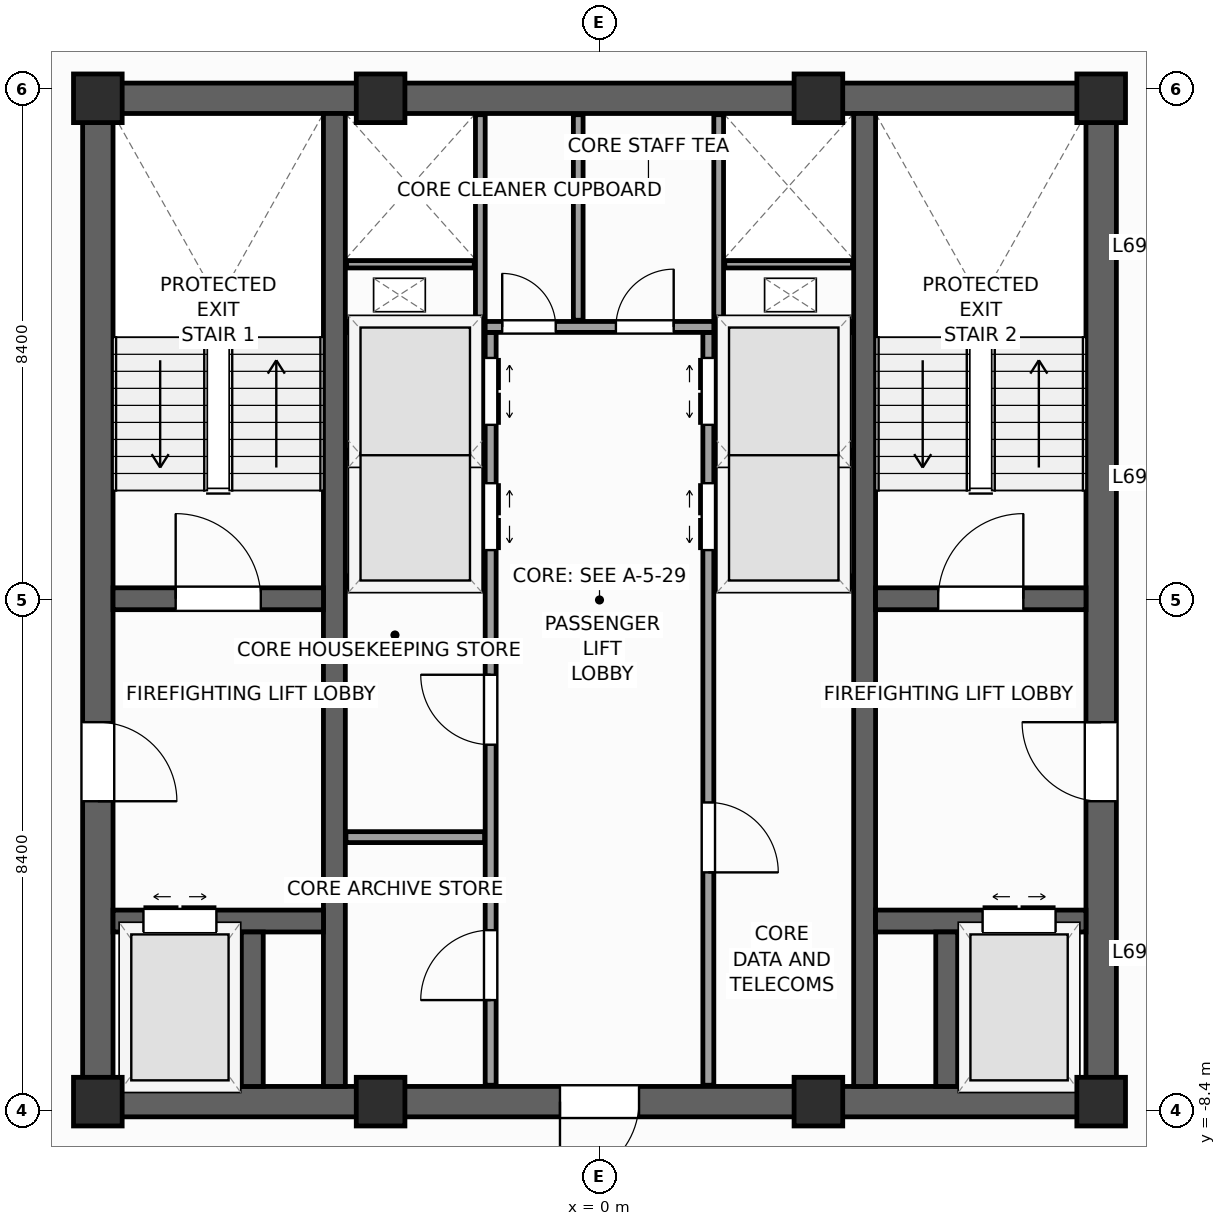
"""IFC4 building model, lengths in metres.
Left out: names, types, materials, properties, quantities, classifications, styles, units other than length and angle.
Written with IfcOpenShell. Run it as: python <this file> out.ifc"""

import sys

from ifc_helpers import new_model, si_unit, direction, frame, frame_2d, origin, origin_2d, place, context, subcontext, project, spatial, rectangle, extrude, source, transform, mapped, element, fill, save


model = new_model("IFC4")
c1 = context("Model", 3, precision=1e-05, world=origin(), true_north=direction((0.0, 1.0)))
c2 = subcontext(c1, "Body", "Model", "MODEL_VIEW")
j1 = project(units=[si_unit("LENGTHUNIT", "METRE"), si_unit("PLANEANGLEUNIT", "RADIAN")], contexts=[c1])
p1 = place(None, origin())
s1 = spatial("IfcSite", under=j1, at=p1, CompositionType="ELEMENT")
p2 = place(p1, origin())
s2 = spatial("IfcBuilding", under=s1, at=p2, CompositionType="ELEMENT")
p3 = place(p2, frame((0.0, 0.0, 283.2)))
s3 = spatial("IfcBuildingStorey", under=s2, at=p3, CompositionType="ELEMENT", Elevation=283.2)
p4 = place(p3, frame((-8.5, -8.25, 0.0), z_axis=(0.0, 0.0, 1.0), x_axis=(1.0, 0.0, 0.0)))
e1 = element("IfcWall", 1, at=p4, inside=s3, PredefinedType="SHEAR", context=c2, shape_type="SweptSolid", body=[
    extrude(rectangle(XDim=17.0, YDim=0.5, at=frame_2d((8.5, 0.0))), origin(), (0.0, 0.0, 1.0), 3.6),
])
p5 = place(p4, frame((7.85, 0.0, 0.0)))
e2 = element("IfcOpeningElement", 2, at=p5, cuts=e1, PredefinedType="OPENING", context=c2, shape_type="SweptSolid", body=[
    extrude(rectangle(XDim=1.3, YDim=2.2, at=frame_2d((0.65, 1.1))), frame((0.0, 0.26, 0.0), z_axis=(0.0, -1.0, 0.0), x_axis=(1.0, 0.0, 0.0)), (0.0, 0.0, 1.0), 0.52),
])
p6 = place(p3, frame((-8.5, 8.25, 0.0), z_axis=(0.0, 0.0, 1.0), x_axis=(1.0, 0.0, 0.0)))
e3 = element("IfcWall", 3, at=p6, inside=s3, PredefinedType="SHEAR", context=c2, shape_type="SweptSolid", body=[
    extrude(rectangle(XDim=17.0, YDim=0.5, at=frame_2d((8.5, 0.0))), origin(), (0.0, 0.0, 1.0), 3.6),
])
p7 = place(p3, frame((-8.25, -8.0, 0.0), z_axis=(0.0, 0.0, 1.0), x_axis=(0.0, 1.0, 0.0)))
e4 = element("IfcWall", 4, at=p7, inside=s3, PredefinedType="SHEAR", context=c2, shape_type="SweptSolid", body=[
    extrude(rectangle(XDim=16.0, YDim=0.5, at=frame_2d((8.0, 0.0))), origin(), (0.0, 0.0, 1.0), 3.6),
])
p8 = place(p7, frame((4.69, 0.0, 0.0)))
e5 = element("IfcOpeningElement", 5, at=p8, cuts=e4, PredefinedType="OPENING", context=c2, shape_type="SweptSolid", body=[
    extrude(rectangle(XDim=1.3, YDim=2.2, at=frame_2d((0.65, 1.1))), frame((0.0, 0.26, 0.0), z_axis=(0.0, -1.0, 0.0), x_axis=(1.0, 0.0, 0.0)), (0.0, 0.0, 1.0), 0.52),
])
p9 = place(p3, frame((8.25, -8.0, 0.0), z_axis=(0.0, 0.0, 1.0), x_axis=(0.0, 1.0, 0.0)))
e6 = element("IfcWall", 6, at=p9, inside=s3, PredefinedType="SHEAR", context=c2, shape_type="SweptSolid", body=[
    extrude(rectangle(XDim=16.0, YDim=0.5, at=frame_2d((8.0, 0.0))), origin(), (0.0, 0.0, 1.0), 3.6),
])
p10 = place(p9, frame((4.69, 0.0, 0.0)))
e7 = element("IfcOpeningElement", 7, at=p10, cuts=e6, PredefinedType="OPENING", context=c2, shape_type="SweptSolid", body=[
    extrude(rectangle(XDim=1.3, YDim=2.2, at=frame_2d((0.65, 1.1))), frame((0.0, 0.26, 0.0), z_axis=(0.0, -1.0, 0.0), x_axis=(1.0, 0.0, 0.0)), (0.0, 0.0, 1.0), 0.52),
])
for number, where, z_axis, x_axis in (
    (8, (-4.36, -8.0, 0.0), (0.0, 0.0, 1.0), (0.0, 1.0, 0.0)),
    (9, (4.36, -8.0, 0.0), (0.0, 0.0, 1.0), (0.0, 1.0, 0.0)),
):
    element("IfcWall", number, at=place(p3, frame(where, z_axis=z_axis, x_axis=x_axis)), inside=s3, PredefinedType="SHEAR", context=c2, shape_type="SweptSolid", body=[
        extrude(rectangle(XDim=16.0, YDim=0.36, at=frame_2d((8.0, 0.0))), origin(), (0.0, 0.0, 1.0), 3.6),
    ])
p11 = place(p3, frame((-8.0, 0.02, 0.0), z_axis=(0.0, 0.0, 1.0), x_axis=(1.0, 0.0, 0.0)))
e10 = element("IfcWall", 10, at=p11, inside=s3, PredefinedType="SHEAR", context=c2, shape_type="SweptSolid", body=[
    extrude(rectangle(XDim=3.46, YDim=0.36, at=frame_2d((1.73, 0.0))), origin(), (0.0, 0.0, 1.0), 3.6),
])
p12 = place(p11, frame((1.03, 0.0, 0.0)))
e11 = element("IfcOpeningElement", 11, at=p12, cuts=e10, PredefinedType="OPENING", context=c2, shape_type="SweptSolid", body=[
    extrude(rectangle(XDim=1.4, YDim=2.2, at=frame_2d((0.7, 1.1))), frame((0.0, 0.19, 0.0), z_axis=(0.0, -1.0, 0.0), x_axis=(1.0, 0.0, 0.0)), (0.0, 0.0, 1.0), 0.38),
])
p13 = place(p3, frame((4.54, 0.02, 0.0), z_axis=(0.0, 0.0, 1.0), x_axis=(1.0, 0.0, 0.0)))
e12 = element("IfcWall", 12, at=p13, inside=s3, PredefinedType="SHEAR", context=c2, shape_type="SweptSolid", body=[
    extrude(rectangle(XDim=3.46, YDim=0.36, at=frame_2d((1.73, 0.0))), origin(), (0.0, 0.0, 1.0), 3.6),
])
p14 = place(p13, frame((1.03, 0.0, 0.0)))
e13 = element("IfcOpeningElement", 13, at=p14, cuts=e12, PredefinedType="OPENING", context=c2, shape_type="SweptSolid", body=[
    extrude(rectangle(XDim=1.4, YDim=2.2, at=frame_2d((0.7, 1.1))), frame((0.0, 0.19, 0.0), z_axis=(0.0, -1.0, 0.0), x_axis=(1.0, 0.0, 0.0)), (0.0, 0.0, 1.0), 0.38),
])
p15 = place(p3, frame((-8.0, -5.28, 0.0), z_axis=(0.0, 0.0, 1.0), x_axis=(1.0, 0.0, 0.0)))
e14 = element("IfcWall", 14, at=p15, inside=s3, PredefinedType="SHEAR", context=c2, shape_type="SweptSolid", body=[
    extrude(rectangle(XDim=3.46, YDim=0.36, at=frame_2d((1.73, 0.0))), origin(), (0.0, 0.0, 1.0), 3.6),
])
p16 = place(p15, frame((0.5, 0.0, 0.0)))
e15 = element("IfcOpeningElement", 15, at=p16, cuts=e14, PredefinedType="OPENING", context=c2, shape_type="SweptSolid", body=[
    extrude(rectangle(XDim=1.2, YDim=2.25, at=frame_2d((0.6, 1.125))), frame((0.0, 0.19, 0.0), z_axis=(0.0, -1.0, 0.0), x_axis=(1.0, 0.0, 0.0)), (0.0, 0.0, 1.0), 0.38),
])
p17 = place(p3, frame((4.54, -5.28, 0.0), z_axis=(0.0, 0.0, 1.0), x_axis=(1.0, 0.0, 0.0)))
e16 = element("IfcWall", 16, at=p17, inside=s3, PredefinedType="SHEAR", context=c2, shape_type="SweptSolid", body=[
    extrude(rectangle(XDim=3.46, YDim=0.36, at=frame_2d((1.73, 0.0))), origin(), (0.0, 0.0, 1.0), 3.6),
])
p18 = place(p17, frame((1.76, 0.0, 0.0)))
e17 = element("IfcOpeningElement", 17, at=p18, cuts=e16, PredefinedType="OPENING", context=c2, shape_type="SweptSolid", body=[
    extrude(rectangle(XDim=1.2, YDim=2.25, at=frame_2d((0.6, 1.125))), frame((0.0, 0.19, 0.0), z_axis=(0.0, -1.0, 0.0), x_axis=(1.0, 0.0, 0.0)), (0.0, 0.0, 1.0), 0.38),
])
for number, where, z_axis, x_axis in (
    (18, (-5.71, -8.0, 0.0), (0.0, 0.0, 1.0), (0.0, 1.0, 0.0)),
    (19, (5.71, -8.0, 0.0), (0.0, 0.0, 1.0), (0.0, 1.0, 0.0)),
):
    element("IfcWall", number, at=place(p3, frame(where, z_axis=z_axis, x_axis=x_axis)), inside=s3, PredefinedType="SHEAR", context=c2, shape_type="SweptSolid", body=[
        extrude(rectangle(XDim=2.54, YDim=0.36, at=frame_2d((1.27, 0.0))), origin(), (0.0, 0.0, 1.0), 3.6),
    ])
m1 = source(origin(), c2, "Body", "SweptSolid", [
    extrude(rectangle(XDim=0.8, YDim=0.8, at=origin_2d()), origin(), (0.0, 0.0, 1.0), 3.6),
])
for number, where, z_axis, x_axis in (
    (20, (-8.25, -8.25, 0.0), (0.0, 0.0, 1.0), (1.0, 0.0, 0.0)),
    (21, (8.25, -8.25, 0.0), (0.0, 0.0, 1.0), (1.0, 0.0, 0.0)),
    (22, (8.25, 8.25, 0.0), (0.0, 0.0, 1.0), (1.0, 0.0, 0.0)),
    (23, (-8.25, 8.25, 0.0), (0.0, 0.0, 1.0), (1.0, 0.0, 0.0)),
    (24, (-3.6, -8.25, 0.0), (0.0, 0.0, 1.0), (1.0, 0.0, 0.0)),
    (25, (3.6, -8.25, 0.0), (0.0, 0.0, 1.0), (1.0, 0.0, 0.0)),
    (26, (-3.6, 8.25, 0.0), (0.0, 0.0, 1.0), (1.0, 0.0, 0.0)),
    (27, (3.6, 8.25, 0.0), (0.0, 0.0, 1.0), (1.0, 0.0, 0.0)),
):
    element("IfcColumn", number, at=place(p3, frame(where, z_axis=z_axis, x_axis=x_axis)), inside=s3, PredefinedType="PILASTER", context=c2, shape_type="MappedRepresentation", body=[
        mapped(m1, transform((0.0, 0.0, 0.0), scale=1.0)),
    ])
p19 = place(p3, frame((-1.79, -7.98, 0.0), z_axis=(0.0, 0.0, 1.0), x_axis=(0.0, 1.0, 0.0)))
e28 = element("IfcWall", 28, at=p19, inside=s3, PredefinedType="PARTITIONING", context=c2, shape_type="SweptSolid", body=[
    extrude(rectangle(XDim=12.38, YDim=0.18, at=frame_2d((6.19, 0.0))), origin(), (0.0, 0.0, 1.0), 3.35),
])
p20 = place(p19, frame((8.8, 0.0, 0.0)))
e29 = element("IfcOpeningElement", 29, at=p20, cuts=e28, PredefinedType="OPENING", context=c2, shape_type="SweptSolid", body=[
    extrude(rectangle(XDim=1.1, YDim=2.2, at=frame_2d((0.55, 1.1))), frame((0.0, 0.1, 0.0), z_axis=(0.0, -1.0, 0.0), x_axis=(1.0, 0.0, 0.0)), (0.0, 0.0, 1.0), 0.2),
])
p21 = place(p19, frame((10.86, 0.0, 0.0)))
e30 = element("IfcOpeningElement", 30, at=p21, cuts=e28, PredefinedType="OPENING", context=c2, shape_type="SweptSolid", body=[
    extrude(rectangle(XDim=1.1, YDim=2.2, at=frame_2d((0.55, 1.1))), frame((0.0, 0.1, 0.0), z_axis=(0.0, -1.0, 0.0), x_axis=(1.0, 0.0, 0.0)), (0.0, 0.0, 1.0), 0.2),
])
p22 = place(p19, frame((1.4, 0.0, 0.0)))
e31 = element("IfcOpeningElement", 31, at=p22, cuts=e28, PredefinedType="OPENING", context=c2, shape_type="SweptSolid", body=[
    extrude(rectangle(XDim=1.15, YDim=2.25, at=frame_2d((0.575, 1.125))), frame((0.0, 0.1, 0.0), z_axis=(0.0, -1.0, 0.0), x_axis=(1.0, 0.0, 0.0)), (0.0, 0.0, 1.0), 0.2),
])
p23 = place(p19, frame((5.6, 0.0, 0.0)))
e32 = element("IfcOpeningElement", 32, at=p23, cuts=e28, PredefinedType="OPENING", context=c2, shape_type="SweptSolid", body=[
    extrude(rectangle(XDim=1.15, YDim=2.25, at=frame_2d((0.575, 1.125))), frame((0.0, 0.1, 0.0), z_axis=(0.0, -1.0, 0.0), x_axis=(1.0, 0.0, 0.0)), (0.0, 0.0, 1.0), 0.2),
])
p24 = place(p3, frame((1.79, -7.98, 0.0), z_axis=(0.0, 0.0, 1.0), x_axis=(0.0, 1.0, 0.0)))
e33 = element("IfcWall", 33, at=p24, inside=s3, PredefinedType="PARTITIONING", context=c2, shape_type="SweptSolid", body=[
    extrude(rectangle(XDim=12.38, YDim=0.18, at=frame_2d((6.19, 0.0))), origin(), (0.0, 0.0, 1.0), 3.35),
])
p25 = place(p24, frame((8.8, 0.0, 0.0)))
e34 = element("IfcOpeningElement", 34, at=p25, cuts=e33, PredefinedType="OPENING", context=c2, shape_type="SweptSolid", body=[
    extrude(rectangle(XDim=1.1, YDim=2.2, at=frame_2d((0.55, 1.1))), frame((0.0, 0.1, 0.0), z_axis=(0.0, -1.0, 0.0), x_axis=(1.0, 0.0, 0.0)), (0.0, 0.0, 1.0), 0.2),
])
p26 = place(p24, frame((10.86, 0.0, 0.0)))
e35 = element("IfcOpeningElement", 35, at=p26, cuts=e33, PredefinedType="OPENING", context=c2, shape_type="SweptSolid", body=[
    extrude(rectangle(XDim=1.1, YDim=2.2, at=frame_2d((0.55, 1.1))), frame((0.0, 0.1, 0.0), z_axis=(0.0, -1.0, 0.0), x_axis=(1.0, 0.0, 0.0)), (0.0, 0.0, 1.0), 0.2),
])
p27 = place(p24, frame((3.5, 0.0, 0.0)))
e36 = element("IfcOpeningElement", 36, at=p27, cuts=e33, PredefinedType="OPENING", context=c2, shape_type="SweptSolid", body=[
    extrude(rectangle(XDim=1.15, YDim=2.25, at=frame_2d((0.575, 1.125))), frame((0.0, 0.1, 0.0), z_axis=(0.0, -1.0, 0.0), x_axis=(1.0, 0.0, 0.0)), (0.0, 0.0, 1.0), 0.2),
])
p28 = place(p3, frame((-1.88, 4.49, 0.0), z_axis=(0.0, 0.0, 1.0), x_axis=(1.0, 0.0, 0.0)))
e37 = element("IfcWall", 37, at=p28, inside=s3, PredefinedType="PARTITIONING", context=c2, shape_type="SweptSolid", body=[
    extrude(rectangle(XDim=3.76, YDim=0.18, at=frame_2d((1.88, 0.0))), origin(), (0.0, 0.0, 1.0), 3.35),
])
p29 = place(p28, frame((0.28, 0.0, 0.0)))
e38 = element("IfcOpeningElement", 38, at=p29, cuts=e37, PredefinedType="OPENING", context=c2, shape_type="SweptSolid", body=[
    extrude(rectangle(XDim=0.88, YDim=2.1, at=frame_2d((0.44, 1.05))), frame((0.0, 0.1, 0.0), z_axis=(0.0, -1.0, 0.0), x_axis=(1.0, 0.0, 0.0)), (0.0, 0.0, 1.0), 0.2),
])
p30 = place(p28, frame((2.15, 0.0, 0.0)))
e39 = element("IfcOpeningElement", 39, at=p30, cuts=e37, PredefinedType="OPENING", context=c2, shape_type="SweptSolid", body=[
    extrude(rectangle(XDim=0.95, YDim=2.1, at=frame_2d((0.475, 1.05))), frame((0.0, 0.1, 0.0), z_axis=(0.0, -1.0, 0.0), x_axis=(1.0, 0.0, 0.0)), (0.0, 0.0, 1.0), 0.2),
])
for number, where, z_axis, x_axis in (
    (40, (-4.17, -3.9, 0.0), (0.0, 0.0, 1.0), (1.0, 0.0, 0.0)),
    (41, (-4.17, 0.3, 0.0), (0.0, 0.0, 1.0), (1.0, 0.0, 0.0)),
    (42, (1.89, 0.3, 0.0), (0.0, 0.0, 1.0), (1.0, 0.0, 0.0)),
    (43, (-4.17, 4.49, 0.0), (0.0, 0.0, 1.0), (1.0, 0.0, 0.0)),
    (44, (1.89, 4.49, 0.0), (0.0, 0.0, 1.0), (1.0, 0.0, 0.0)),
):
    element("IfcWall", number, at=place(p3, frame(where, z_axis=z_axis, x_axis=x_axis)), inside=s3, PredefinedType="PARTITIONING", context=c2, shape_type="SweptSolid", body=[
        extrude(rectangle(XDim=2.28, YDim=0.18, at=frame_2d((1.14, 0.0))), origin(), (0.0, 0.0, 1.0), 3.35),
    ])
for number, where, z_axis, x_axis in (
    (45, (-4.16, 2.4, 0.0), (0.0, 0.0, 1.0), (1.0, 0.0, 0.0)),
    (46, (1.9, 2.4, 0.0), (0.0, 0.0, 1.0), (1.0, 0.0, 0.0)),
):
    element("IfcWall", number, at=place(p3, frame(where, z_axis=z_axis, x_axis=x_axis)), inside=s3, PredefinedType="PARTITIONING", context=c2, shape_type="SweptSolid", body=[
        extrude(rectangle(XDim=2.26, YDim=0.12, at=frame_2d((1.13, 0.0))), origin(), (0.0, 0.0, 1.0), 3.35),
    ])
for number, where, z_axis, x_axis in (
    (47, (-1.96, 4.58, 0.0), (0.0, 0.0, 1.0), (0.0, 1.0, 0.0)),
    (48, (1.96, 4.58, 0.0), (0.0, 0.0, 1.0), (0.0, 1.0, 0.0)),
):
    element("IfcWall", number, at=place(p3, frame(where, z_axis=z_axis, x_axis=x_axis)), inside=s3, PredefinedType="PARTITIONING", context=c2, shape_type="SweptSolid", body=[
        extrude(rectangle(XDim=3.4, YDim=0.16, at=frame_2d((1.7, 0.0))), origin(), (0.0, 0.0, 1.0), 3.35),
    ])
for number, where, z_axis, x_axis in (
    (49, (-4.16, 5.52, 0.0), (0.0, 0.0, 1.0), (1.0, 0.0, 0.0)),
    (50, (2.06, 5.52, 0.0), (0.0, 0.0, 1.0), (1.0, 0.0, 0.0)),
):
    element("IfcWall", number, at=place(p3, frame(where, z_axis=z_axis, x_axis=x_axis)), inside=s3, PredefinedType="PARTITIONING", context=c2, shape_type="SweptSolid", body=[
        extrude(rectangle(XDim=2.1, YDim=0.12, at=frame_2d((1.05, 0.0))), origin(), (0.0, 0.0, 1.0), 3.35),
    ])
p31 = place(p3, frame((-0.35, 4.6, 0.0), z_axis=(0.0, 0.0, 1.0), x_axis=(0.0, 1.0, 0.0)))
e51 = element("IfcWall", 51, at=p31, inside=s3, PredefinedType="PARTITIONING", context=c2, shape_type="SweptSolid", body=[
    extrude(rectangle(XDim=3.38, YDim=0.16, at=frame_2d((1.69, 0.0))), origin(), (0.0, 0.0, 1.0), 3.35),
])
m2 = source(origin(), c2, "Body", "SweptSolid", [
    extrude(rectangle(XDim=1.4, YDim=2.2, at=frame_2d((0.7, 1.1))), frame((0.0, 0.025, 0.0), z_axis=(0.0, -1.0, 0.0), x_axis=(1.0, 0.0, 0.0)), (0.0, 0.0, 1.0), 0.05),
])
p32 = place(p12, origin())
e52 = element("IfcDoor", 52, at=p32, inside=s3, OperationType="SINGLE_SWING_LEFT", PredefinedType="DOOR", context=c2, shape_type="MappedRepresentation", body=[
    mapped(m2, transform((0.0, 0.0, 0.0), scale=1.0)),
])
fill(e11, e52)
p33 = place(p14, origin())
e53 = element("IfcDoor", 53, at=p33, inside=s3, OperationType="SINGLE_SWING_RIGHT", PredefinedType="DOOR", context=c2, shape_type="MappedRepresentation", body=[
    mapped(m2, transform((0.0, 0.0, 0.0), scale=1.0)),
])
fill(e13, e53)
m3 = source(origin(), c2, "Body", "SweptSolid", [
    extrude(rectangle(XDim=1.3, YDim=2.2, at=frame_2d((0.65, 1.1))), frame((0.0, 0.025, 0.0), z_axis=(0.0, -1.0, 0.0), x_axis=(1.0, 0.0, 0.0)), (0.0, 0.0, 1.0), 0.05),
])
p34 = place(p8, frame((1.3, 0.0, 0.0), z_axis=(0.0, 0.0, 1.0), x_axis=(-1.0, 0.0, 0.0)))
e54 = element("IfcDoor", 54, at=p34, inside=s3, OperationType="SINGLE_SWING_LEFT", PredefinedType="DOOR", context=c2, shape_type="MappedRepresentation", body=[
    mapped(m3, transform((0.0, 0.0, 0.0), scale=1.0)),
])
fill(e5, e54)
p35 = place(p10, origin())
e55 = element("IfcDoor", 55, at=p35, inside=s3, OperationType="SINGLE_SWING_RIGHT", PredefinedType="DOOR", context=c2, shape_type="MappedRepresentation", body=[
    mapped(m3, transform((0.0, 0.0, 0.0), scale=1.0)),
])
fill(e7, e55)
p36 = place(p5, frame((1.3, 0.0, 0.0), z_axis=(0.0, 0.0, 1.0), x_axis=(-1.0, 0.0, 0.0)))
e56 = element("IfcDoor", 56, at=p36, inside=s3, OperationType="SINGLE_SWING_LEFT", PredefinedType="DOOR", context=c2, shape_type="MappedRepresentation", body=[
    mapped(m3, transform((0.0, 0.0, 0.0), scale=1.0)),
])
fill(e2, e56)
m4 = source(origin(), c2, "Body", "SweptSolid", [
    extrude(rectangle(XDim=1.2, YDim=2.25, at=frame_2d((0.6, 1.125))), frame((0.0, 0.025, 0.0), z_axis=(0.0, -1.0, 0.0), x_axis=(1.0, 0.0, 0.0)), (0.0, 0.0, 1.0), 0.05),
])
p37 = place(p16, origin())
e57 = element("IfcDoor", 57, at=p37, inside=s3, OperationType="DOUBLE_DOOR_SLIDING", PredefinedType="DOOR", context=c2, shape_type="MappedRepresentation", body=[
    mapped(m4, transform((0.0, 0.0, 0.0), scale=1.0)),
])
fill(e15, e57)
p38 = place(p18, origin())
e58 = element("IfcDoor", 58, at=p38, inside=s3, OperationType="DOUBLE_DOOR_SLIDING", PredefinedType="DOOR", context=c2, shape_type="MappedRepresentation", body=[
    mapped(m4, transform((0.0, 0.0, 0.0), scale=1.0)),
])
fill(e17, e58)
m5 = source(origin(), c2, "Body", "SweptSolid", [
    extrude(rectangle(XDim=1.1, YDim=2.2, at=frame_2d((0.55, 1.1))), frame((0.0, 0.025, 0.0), z_axis=(0.0, -1.0, 0.0), x_axis=(1.0, 0.0, 0.0)), (0.0, 0.0, 1.0), 0.05),
])
p39 = place(p20, frame((1.1, 0.0, 0.0), z_axis=(0.0, 0.0, 1.0), x_axis=(-1.0, 0.0, 0.0)))
e59 = element("IfcDoor", 59, at=p39, inside=s3, OperationType="DOUBLE_DOOR_SLIDING", PredefinedType="DOOR", context=c2, shape_type="MappedRepresentation", body=[
    mapped(m5, transform((0.0, 0.0, 0.0), scale=1.0)),
])
fill(e29, e59)
p40 = place(p21, frame((1.1, 0.0, 0.0), z_axis=(0.0, 0.0, 1.0), x_axis=(-1.0, 0.0, 0.0)))
e60 = element("IfcDoor", 60, at=p40, inside=s3, OperationType="DOUBLE_DOOR_SLIDING", PredefinedType="DOOR", context=c2, shape_type="MappedRepresentation", body=[
    mapped(m5, transform((0.0, 0.0, 0.0), scale=1.0)),
])
fill(e30, e60)
p41 = place(p25, origin())
e61 = element("IfcDoor", 61, at=p41, inside=s3, OperationType="DOUBLE_DOOR_SLIDING", PredefinedType="DOOR", context=c2, shape_type="MappedRepresentation", body=[
    mapped(m5, transform((0.0, 0.0, 0.0), scale=1.0)),
])
fill(e34, e61)
p42 = place(p26, origin())
e62 = element("IfcDoor", 62, at=p42, inside=s3, OperationType="DOUBLE_DOOR_SLIDING", PredefinedType="DOOR", context=c2, shape_type="MappedRepresentation", body=[
    mapped(m5, transform((0.0, 0.0, 0.0), scale=1.0)),
])
fill(e35, e62)
m6 = source(origin(), c2, "Body", "SweptSolid", [
    extrude(rectangle(XDim=1.15, YDim=2.25, at=frame_2d((0.575, 1.125))), frame((0.0, 0.025, 0.0), z_axis=(0.0, -1.0, 0.0), x_axis=(1.0, 0.0, 0.0)), (0.0, 0.0, 1.0), 0.05),
])
p43 = place(p22, origin())
e63 = element("IfcDoor", 63, at=p43, inside=s3, OperationType="SINGLE_SWING_LEFT", PredefinedType="DOOR", context=c2, shape_type="MappedRepresentation", body=[
    mapped(m6, transform((0.0, 0.0, 0.0), scale=1.0)),
])
fill(e31, e63)
p44 = place(p23, origin())
e64 = element("IfcDoor", 64, at=p44, inside=s3, OperationType="SINGLE_SWING_RIGHT", PredefinedType="DOOR", context=c2, shape_type="MappedRepresentation", body=[
    mapped(m6, transform((0.0, 0.0, 0.0), scale=1.0)),
])
fill(e32, e64)
p45 = place(p27, frame((1.15, 0.0, 0.0), z_axis=(0.0, 0.0, 1.0), x_axis=(-1.0, 0.0, 0.0)))
e65 = element("IfcDoor", 65, at=p45, inside=s3, OperationType="SINGLE_SWING_LEFT", PredefinedType="DOOR", context=c2, shape_type="MappedRepresentation", body=[
    mapped(m6, transform((0.0, 0.0, 0.0), scale=1.0)),
])
fill(e36, e65)
m7 = source(origin(), c2, "Body", "SweptSolid", [
    extrude(rectangle(XDim=0.88, YDim=2.1, at=frame_2d((0.44, 1.05))), frame((0.0, 0.025, 0.0), z_axis=(0.0, -1.0, 0.0), x_axis=(1.0, 0.0, 0.0)), (0.0, 0.0, 1.0), 0.05),
])
p46 = place(p29, origin())
e66 = element("IfcDoor", 66, at=p46, inside=s3, OperationType="SINGLE_SWING_LEFT", PredefinedType="DOOR", context=c2, shape_type="MappedRepresentation", body=[
    mapped(m7, transform((0.0, 0.0, 0.0), scale=1.0)),
])
fill(e38, e66)
m8 = source(origin(), c2, "Body", "SweptSolid", [
    extrude(rectangle(XDim=0.95, YDim=2.1, at=frame_2d((0.475, 1.05))), frame((0.0, 0.025, 0.0), z_axis=(0.0, -1.0, 0.0), x_axis=(1.0, 0.0, 0.0)), (0.0, 0.0, 1.0), 0.05),
])
p47 = place(p30, origin())
e67 = element("IfcDoor", 67, at=p47, inside=s3, OperationType="SINGLE_SWING_RIGHT", PredefinedType="DOOR", context=c2, shape_type="MappedRepresentation", body=[
    mapped(m8, transform((0.0, 0.0, 0.0), scale=1.0)),
])
fill(e39, e67)
save(model, sys.argv[1])
